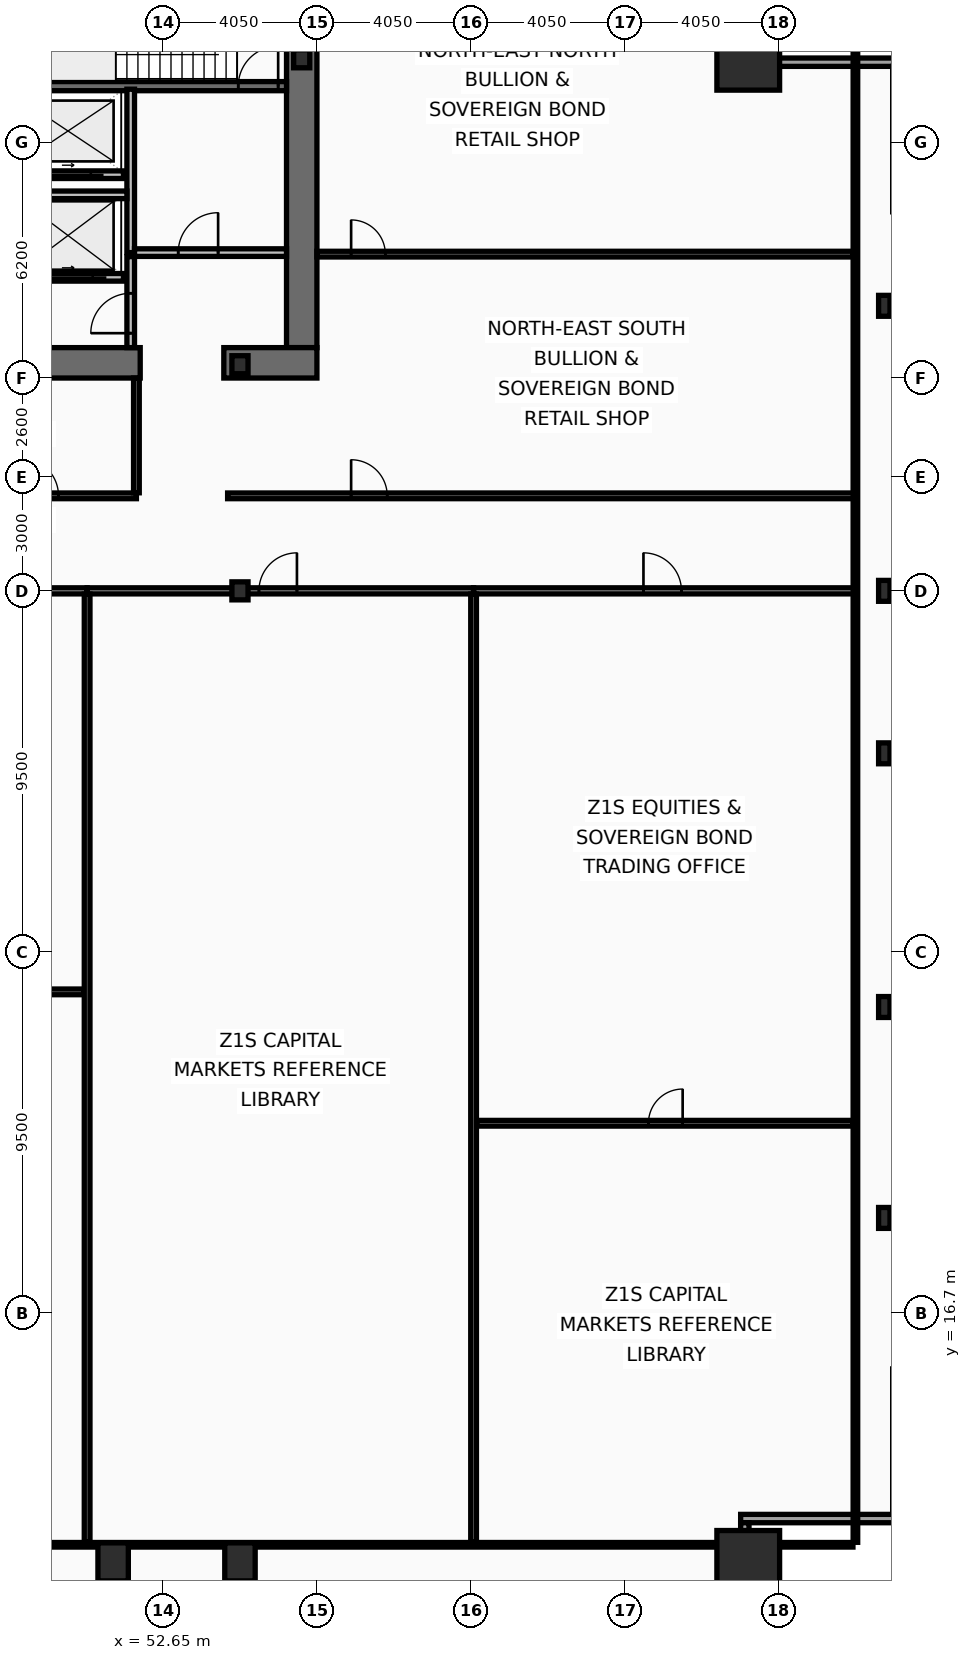
"""IFC4 building model, lengths in metres.
Left out: names, types, materials, properties, quantities, classifications, styles, units other than length and angle.
Written with IfcOpenShell. Run it as: python <this file> out.ifc"""

import sys

from ifc_helpers import new_model, si_unit, direction, frame, frame_2d, origin, origin_2d, place, context, subcontext, project, spatial, rectangle, hollow_rectangle, i_section, extrude, element, fill, save


model = new_model("IFC4")
c1 = context("Model", 3, precision=1e-05, world=origin(), true_north=direction((0.0, 1.0)))
c2 = subcontext(c1, "Body", "Model", "MODEL_VIEW")
j1 = project(units=[si_unit("LENGTHUNIT", "METRE"), si_unit("PLANEANGLEUNIT", "RADIAN")], contexts=[c1])
p1 = place(None, origin())
s1 = spatial("IfcSite", under=j1, at=p1, CompositionType="ELEMENT")
p2 = place(p1, origin())
s2 = spatial("IfcBuilding", under=s1, at=p2, CompositionType="ELEMENT")
p3 = place(p2, frame((0.0, 0.0, 65.8)))
s3 = spatial("IfcBuildingStorey", under=s2, at=p3, CompositionType="ELEMENT", Elevation=65.8)
p4 = place(p3, frame((56.3, 52.9, 0.0), z_axis=(0.0, 0.0, 1.0), x_axis=(0.0, -1.0, 0.0)))
e1 = element("IfcWall", 1, at=p4, inside=s3, PredefinedType="SHEAR", context=c2, shape_type="SweptSolid", body=[
    extrude(rectangle(XDim=10.8, YDim=0.8, at=frame_2d((5.4, 0.0))), origin(), (0.0, 0.0, 1.0), 3.82),
])
p5 = place(p3, frame((52.05, 41.7, 0.0), z_axis=(0.0, 0.0, 1.0), x_axis=(-1.0, 0.0, 0.0)))
e2 = element("IfcWall", 2, at=p5, inside=s3, PredefinedType="SHEAR", context=c2, shape_type="SweptSolid", body=[
    extrude(rectangle(XDim=11.3, YDim=0.8, at=frame_2d((5.65, 0.0))), origin(), (0.0, 0.0, 1.0), 3.82),
])
p6 = place(p3, frame((56.7, 41.7, 0.0), z_axis=(0.0, 0.0, 1.0), x_axis=(-1.0, 0.0, 0.0)))
e3 = element("IfcWall", 3, at=p6, inside=s3, PredefinedType="SHEAR", context=c2, shape_type="SweptSolid", body=[
    extrude(rectangle(XDim=2.45, YDim=0.8, at=frame_2d((1.225, 0.0))), origin(), (0.0, 0.0, 1.0), 3.82),
])
p7 = place(p3, frame((48.63, 48.98, 0.0), z_axis=(0.0, 0.0, 1.0), x_axis=(1.0, 0.0, 0.0)))
e4 = element("IfcWall", 4, at=p7, inside=s3, PredefinedType="SHEAR", context=c2, shape_type="SweptSolid", body=[
    extrude(rectangle(XDim=7.27, YDim=0.24, at=frame_2d((3.635, 0.0))), origin(), (0.0, 0.0, 1.0), 3.82),
])
p8 = place(p7, frame((6.0, 0.0, 0.0)))
e5 = element("IfcOpeningElement", 5, at=p8, cuts=e4, PredefinedType="OPENING", context=c2, shape_type="SweptSolid", body=[
    extrude(rectangle(XDim=1.05, YDim=2.15, at=frame_2d((0.525, 1.075))), frame((0.0, 0.13, 0.0), z_axis=(0.0, -1.0, 0.0), x_axis=(1.0, 0.0, 0.0)), (0.0, 0.0, 1.0), 0.26),
])
for number, where, z_axis, x_axis in (
    (6, (68.05, 10.15, 0.0), (0.0, 0.0, 1.0), (1.0, 0.0, 0.0)),
    (7, (68.05, 49.7, 0.0), (0.0, 0.0, 1.0), (1.0, 0.0, 0.0)),
):
    element("IfcColumn", number, at=place(p3, frame(where, z_axis=z_axis, x_axis=x_axis)), inside=s3, PredefinedType="COLUMN", context=c2, shape_type="SweptSolid", body=[
        extrude(hollow_rectangle(XDim=1.65, YDim=1.65, WallThickness=0.075, at=origin_2d()), origin(), (0.0, 0.0, 1.0), 4.0),
    ])
for number, where, z_axis, x_axis in (
    (8, (51.337, 10.15, 0.0), (0.0, 0.0, 1.0), (1.0, 0.0, 0.0)),
    (9, (54.675, 10.15, 0.0), (0.0, 0.0, 1.0), (1.0, 0.0, 0.0)),
):
    element("IfcColumn", number, at=place(p3, frame(where, z_axis=z_axis, x_axis=x_axis)), inside=s3, PredefinedType="COLUMN", context=c2, shape_type="SweptSolid", body=[
        extrude(hollow_rectangle(XDim=0.8, YDim=1.0, WallThickness=0.055, at=origin_2d()), origin(), (0.0, 0.0, 1.0), 4.0),
    ])
for number, where, z_axis, x_axis in (
    (10, (71.63, 19.2, 0.0), (0.0, 0.0, 1.0), (1.0, 0.0, 0.0)),
    (11, (71.63, 24.75, 0.0), (0.0, 0.0, 1.0), (1.0, 0.0, 0.0)),
    (12, (71.63, 31.425, 0.0), (0.0, 0.0, 1.0), (1.0, 0.0, 0.0)),
    (13, (71.63, 35.7, 0.0), (0.0, 0.0, 1.0), (1.0, 0.0, 0.0)),
    (14, (71.63, 43.2, 0.0), (0.0, 0.0, 1.0), (1.0, 0.0, 0.0)),
):
    element("IfcColumn", number, at=place(p3, frame(where, z_axis=z_axis, x_axis=x_axis)), inside=s3, PredefinedType="COLUMN", context=c2, shape_type="SweptSolid", body=[
        extrude(i_section(OverallWidth=0.3, OverallDepth=0.55, WebThickness=0.015, FlangeThickness=0.029, at=origin_2d()), origin(), (0.0, 0.0, 1.0), 4.0),
    ])
for number, where, z_axis, x_axis in (
    (15, (56.3, 49.7, 0.0), (0.0, 0.0, 1.0), (1.0, 0.0, 0.0)),
    (16, (54.675, 35.7, 0.0), (0.0, 0.0, 1.0), (1.0, 0.0, 0.0)),
    (17, (54.675, 41.65, 0.0), (0.0, 0.0, 1.0), (1.0, 0.0, 0.0)),
):
    element("IfcColumn", number, at=place(p3, frame(where, z_axis=z_axis, x_axis=x_axis)), inside=s3, PredefinedType="COLUMN", context=c2, shape_type="SweptSolid", body=[
        extrude(i_section(OverallWidth=0.424, OverallDepth=0.474, WebThickness=0.048, FlangeThickness=0.077, at=origin_2d()), origin(), (0.0, 0.0, 1.0), 4.0),
    ])
p9 = place(p3, frame((67.96, 53.63, 0.0), z_axis=(0.0, 0.0, 1.0), x_axis=(0.0, -1.0, 0.0)))
e18 = element("IfcWall", 18, at=p9, inside=s3, PredefinedType="SOLIDWALL", context=c2, shape_type="SweptSolid", body=[
    extrude(rectangle(XDim=3.91, YDim=0.22, at=frame_2d((1.955, 0.0))), origin(), (0.0, 0.0, 1.0), 3.16),
])
for number, where, z_axis, x_axis in (
    (19, (67.85, 49.61, 0.0), (0.0, 0.0, 1.0), (1.0, 0.0, 0.0)),
    (20, (72.07, 11.29, 0.0), (0.0, 0.0, 1.0), (-1.0, 0.0, 0.0)),
):
    element("IfcWall", number, at=place(p3, frame(where, z_axis=z_axis, x_axis=x_axis)), inside=s3, PredefinedType="SOLIDWALL", context=c2, shape_type="SweptSolid", body=[
        extrude(rectangle(XDim=4.22, YDim=0.22, at=frame_2d((2.11, 0.0))), origin(), (0.0, 0.0, 1.0), 3.16),
    ])
p10 = place(p3, frame((67.96, 11.18, 0.0), z_axis=(0.0, 0.0, 1.0), x_axis=(0.0, -1.0, 0.0)))
e21 = element("IfcWall", 21, at=p10, inside=s3, PredefinedType="SOLIDWALL", context=c2, shape_type="SweptSolid", body=[
    extrude(rectangle(XDim=3.91, YDim=0.22, at=frame_2d((1.955, 0.0))), origin(), (0.0, 0.0, 1.0), 3.16),
])
p11 = place(p3, frame((51.61, 43.95, 0.0), z_axis=(0.0, 0.0, 1.0), x_axis=(-1.0, 0.0, 0.0)))
e22 = element("IfcWall", 22, at=p11, inside=s3, PredefinedType="PARTITIONING", context=c2, shape_type="SweptSolid", body=[
    extrude(rectangle(XDim=2.92, YDim=0.2, at=frame_2d((1.46, 0.0))), origin(), (0.0, 0.0, 1.0), 3.82),
])
p12 = place(p11, frame((0.81, 0.0, 0.0)))
e23 = element("IfcOpeningElement", 23, at=p12, cuts=e22, PredefinedType="OPENING", context=c2, shape_type="SweptSolid", body=[
    extrude(rectangle(XDim=1.3, YDim=2.18, at=frame_2d((0.65, 1.09))), frame((0.0, 0.11, 0.0), z_axis=(0.0, -1.0, 0.0), x_axis=(1.0, 0.0, 0.0)), (0.0, 0.0, 1.0), 0.22),
])
p13 = place(p3, frame((51.61, 46.65, 0.0), z_axis=(0.0, 0.0, 1.0), x_axis=(-1.0, 0.0, 0.0)))
e24 = element("IfcWall", 24, at=p13, inside=s3, PredefinedType="PARTITIONING", context=c2, shape_type="SweptSolid", body=[
    extrude(rectangle(XDim=2.92, YDim=0.2, at=frame_2d((1.46, 0.0))), origin(), (0.0, 0.0, 1.0), 3.82),
])
p14 = place(p13, frame((0.86, 0.0, 0.0)))
e25 = element("IfcOpeningElement", 25, at=p14, cuts=e24, PredefinedType="OPENING", context=c2, shape_type="SweptSolid", body=[
    extrude(rectangle(XDim=1.2, YDim=2.18, at=frame_2d((0.6, 1.09))), frame((0.0, 0.11, 0.0), z_axis=(0.0, -1.0, 0.0), x_axis=(1.0, 0.0, 0.0)), (0.0, 0.0, 1.0), 0.22),
])
p15 = place(p3, frame((51.8, 44.6, 0.0), z_axis=(0.0, 0.0, 1.0), x_axis=(0.0, 1.0, 0.0)))
e26 = element("IfcWall", 26, at=p15, inside=s3, PredefinedType="PARTITIONING", context=c2, shape_type="SweptSolid", body=[
    extrude(rectangle(XDim=4.3, YDim=0.2, at=frame_2d((2.15, 0.0))), origin(), (0.0, 0.0, 1.0), 3.82),
])
p16 = place(p3, frame((51.9, 44.6, 0.0), z_axis=(0.0, 0.0, 1.0), x_axis=(1.0, 0.0, 0.0)))
e27 = element("IfcWall", 27, at=p16, inside=s3, PredefinedType="PARTITIONING", context=c2, shape_type="SweptSolid", body=[
    extrude(rectangle(XDim=4.0, YDim=0.2, at=frame_2d((2.0, 0.0))), origin(), (0.0, 0.0, 1.0), 3.82),
])
p17 = place(p16, frame((1.15, 0.0, 0.0)))
e28 = element("IfcOpeningElement", 28, at=p17, cuts=e27, PredefinedType="OPENING", context=c2, shape_type="SweptSolid", body=[
    extrude(rectangle(XDim=1.05, YDim=2.15, at=frame_2d((0.525, 1.075))), frame((0.0, 0.11, 0.0), z_axis=(0.0, -1.0, 0.0), x_axis=(1.0, 0.0, 0.0)), (0.0, 0.0, 1.0), 0.22),
])
p18 = place(p3, frame((48.63, 46.12, 0.0), z_axis=(0.0, 0.0, 1.0), x_axis=(1.0, 0.0, 0.0)))
e29 = element("IfcWall", 29, at=p18, inside=s3, PredefinedType="PARTITIONING", context=c2, shape_type="SweptSolid", body=[
    extrude(rectangle(XDim=3.07, YDim=0.2, at=frame_2d((1.535, 0.0))), origin(), (0.0, 0.0, 1.0), 3.82),
])
p19 = place(p3, frame((51.8, 42.1, 0.0), z_axis=(0.0, 0.0, 1.0), x_axis=(0.0, 1.0, 0.0)))
e30 = element("IfcWall", 30, at=p19, inside=s3, PredefinedType="PARTITIONING", context=c2, shape_type="SweptSolid", body=[
    extrude(rectangle(XDim=2.395, YDim=0.2, at=frame_2d((1.198, 0.0))), origin(), (0.0, 0.0, 1.0), 3.82),
])
p20 = place(p19, frame((0.38, 0.0, 0.0)))
e31 = element("IfcOpeningElement", 31, at=p20, cuts=e30, PredefinedType="OPENING", context=c2, shape_type="SweptSolid", body=[
    extrude(rectangle(XDim=1.05, YDim=2.15, at=frame_2d((0.525, 1.075))), frame((0.0, 0.11, 0.0), z_axis=(0.0, -1.0, 0.0), x_axis=(1.0, 0.0, 0.0)), (0.0, 0.0, 1.0), 0.22),
])
p21 = place(p3, frame((47.8, 38.2, 0.0), z_axis=(0.0, 0.0, 1.0), x_axis=(1.0, 0.0, 0.0)))
e32 = element("IfcWall", 32, at=p21, inside=s3, PredefinedType="PARTITIONING", context=c2, shape_type="SweptSolid", body=[
    extrude(rectangle(XDim=4.15, YDim=0.15, at=frame_2d((2.075, 0.0))), origin(), (0.0, 0.0, 1.0), 3.01),
])
p22 = place(p21, frame((1.1, 0.0, 0.0)))
e33 = element("IfcOpeningElement", 33, at=p22, cuts=e32, PredefinedType="OPENING", context=c2, shape_type="SweptSolid", body=[
    extrude(rectangle(XDim=1.0, YDim=2.05, at=frame_2d((0.5, 1.025))), frame((0.0, 0.085, 0.0), z_axis=(0.0, -1.0, 0.0), x_axis=(1.0, 0.0, 0.0)), (0.0, 0.0, 1.0), 0.17),
])
p23 = place(p3, frame((51.95, 38.28, 0.0), z_axis=(0.0, 0.0, 1.0), x_axis=(0.0, 1.0, 0.0)))
e34 = element("IfcWall", 34, at=p23, inside=s3, PredefinedType="PARTITIONING", context=c2, shape_type="SweptSolid", body=[
    extrude(rectangle(XDim=3.02, YDim=0.15, at=frame_2d((1.51, 0.0))), origin(), (0.0, 0.0, 1.0), 3.82),
])
p24 = place(p3, frame((54.35, 38.2, 0.0), z_axis=(0.0, 0.0, 1.0), x_axis=(1.0, 0.0, 0.0)))
e35 = element("IfcWall", 35, at=p24, inside=s3, PredefinedType="PARTITIONING", context=c2, shape_type="SweptSolid", body=[
    extrude(rectangle(XDim=16.52, YDim=0.15, at=frame_2d((8.26, 0.0))), origin(), (0.0, 0.0, 1.0), 3.01),
])
p25 = place(p24, frame((3.25, 0.0, 0.0)))
e36 = element("IfcOpeningElement", 36, at=p25, cuts=e35, PredefinedType="OPENING", context=c2, shape_type="SweptSolid", body=[
    extrude(rectangle(XDim=0.95, YDim=2.05, at=frame_2d((0.475, 1.025))), frame((0.0, 0.085, 0.0), z_axis=(0.0, -1.0, 0.0), x_axis=(1.0, 0.0, 0.0)), (0.0, 0.0, 1.0), 0.17),
])
p26 = place(p3, frame((56.7, 44.56, 0.0), z_axis=(0.0, 0.0, 1.0), x_axis=(1.0, 0.0, 0.0)))
e37 = element("IfcWall", 37, at=p26, inside=s3, PredefinedType="PARTITIONING", context=c2, shape_type="SweptSolid", body=[
    extrude(rectangle(XDim=14.105, YDim=0.15, at=frame_2d((7.052, 0.0))), origin(), (0.0, 0.0, 1.0), 3.16),
])
p27 = place(p26, frame((0.9, 0.0, 0.0)))
e38 = element("IfcOpeningElement", 38, at=p27, cuts=e37, PredefinedType="OPENING", context=c2, shape_type="SweptSolid", body=[
    extrude(rectangle(XDim=0.9, YDim=2.05, at=frame_2d((0.45, 1.025))), frame((0.0, 0.085, 0.0), z_axis=(0.0, -1.0, 0.0), x_axis=(1.0, 0.0, 0.0)), (0.0, 0.0, 1.0), 0.17),
])
p28 = place(p3, frame((42.49, 35.7, 0.0), z_axis=(0.0, 0.0, 1.0), x_axis=(1.0, 0.0, 0.0)))
e39 = element("IfcWall", 39, at=p28, inside=s3, PredefinedType="PARTITIONING", context=c2, shape_type="SweptSolid", body=[
    extrude(rectangle(XDim=8.163, YDim=0.16, at=frame_2d((4.082, 0.0))), origin(), (0.0, 0.0, 1.0), 3.01),
])
p29 = place(p28, frame((3.678, 0.0, 0.0)))
e40 = element("IfcOpeningElement", 40, at=p29, cuts=e39, PredefinedType="OPENING", context=c2, shape_type="SweptSolid", body=[
    extrude(rectangle(XDim=1.0, YDim=2.05, at=frame_2d((0.5, 1.025))), frame((0.0, 0.09, 0.0), z_axis=(0.0, -1.0, 0.0), x_axis=(1.0, 0.0, 0.0)), (0.0, 0.0, 1.0), 0.18),
])
p30 = place(p3, frame((42.571, 25.148, 0.0), z_axis=(0.0, 0.0, 1.0), x_axis=(1.0, 0.0, 0.0)))
e41 = element("IfcWall", 41, at=p30, inside=s3, PredefinedType="PARTITIONING", context=c2, shape_type="SweptSolid", body=[
    extrude(rectangle(XDim=8.003, YDim=0.15, at=frame_2d((4.001, 0.0))), origin(), (0.0, 0.0, 1.0), 3.01),
])
p31 = place(p30, frame((3.673, 0.0, 0.0)))
e42 = element("IfcOpeningElement", 42, at=p31, cuts=e41, PredefinedType="OPENING", context=c2, shape_type="SweptSolid", body=[
    extrude(rectangle(XDim=0.9, YDim=2.05, at=frame_2d((0.45, 1.025))), frame((0.0, 0.085, 0.0), z_axis=(0.0, -1.0, 0.0), x_axis=(1.0, 0.0, 0.0)), (0.0, 0.0, 1.0), 0.17),
])
p32 = place(p3, frame((50.653, 35.7, 0.0), z_axis=(0.0, 0.0, 1.0), x_axis=(1.0, 0.0, 0.0)))
e43 = element("IfcWall", 43, at=p32, inside=s3, PredefinedType="PARTITIONING", context=c2, shape_type="SweptSolid", body=[
    extrude(rectangle(XDim=10.169, YDim=0.16, at=frame_2d((5.084, 0.0))), origin(), (0.0, 0.0, 1.0), 3.01),
])
p33 = place(p32, frame((4.521, 0.0, 0.0)))
e44 = element("IfcOpeningElement", 44, at=p33, cuts=e43, PredefinedType="OPENING", context=c2, shape_type="SweptSolid", body=[
    extrude(rectangle(XDim=1.0, YDim=2.05, at=frame_2d((0.5, 1.025))), frame((0.0, 0.09, 0.0), z_axis=(0.0, -1.0, 0.0), x_axis=(1.0, 0.0, 0.0)), (0.0, 0.0, 1.0), 0.18),
])
p34 = place(p3, frame((50.653, 10.665, 0.0), z_axis=(0.0, 0.0, 1.0), x_axis=(0.0, 1.0, 0.0)))
e45 = element("IfcWall", 45, at=p34, inside=s3, PredefinedType="PARTITIONING", context=c2, shape_type="SweptSolid", body=[
    extrude(rectangle(XDim=24.95, YDim=0.15, at=frame_2d((12.475, 0.0))), origin(), (0.0, 0.0, 1.0), 3.21),
])
p35 = place(p3, frame((60.823, 35.7, 0.0), z_axis=(0.0, 0.0, 1.0), x_axis=(1.0, 0.0, 0.0)))
e46 = element("IfcWall", 46, at=p35, inside=s3, PredefinedType="PARTITIONING", context=c2, shape_type="SweptSolid", body=[
    extrude(rectangle(XDim=10.048, YDim=0.16, at=frame_2d((5.024, 0.0))), origin(), (0.0, 0.0, 1.0), 3.01),
])
p36 = place(p35, frame((4.47, 0.0, 0.0)))
e47 = element("IfcOpeningElement", 47, at=p36, cuts=e46, PredefinedType="OPENING", context=c2, shape_type="SweptSolid", body=[
    extrude(rectangle(XDim=1.0, YDim=2.05, at=frame_2d((0.5, 1.025))), frame((0.0, 0.09, 0.0), z_axis=(0.0, -1.0, 0.0), x_axis=(1.0, 0.0, 0.0)), (0.0, 0.0, 1.0), 0.18),
])
p37 = place(p3, frame((60.823, 10.665, 0.0), z_axis=(0.0, 0.0, 1.0), x_axis=(0.0, 1.0, 0.0)))
e48 = element("IfcWall", 48, at=p37, inside=s3, PredefinedType="PARTITIONING", context=c2, shape_type="SweptSolid", body=[
    extrude(rectangle(XDim=24.95, YDim=0.15, at=frame_2d((12.475, 0.0))), origin(), (0.0, 0.0, 1.0), 3.01),
])
p38 = place(p3, frame((60.903, 21.692, 0.0), z_axis=(0.0, 0.0, 1.0), x_axis=(1.0, 0.0, 0.0)))
e49 = element("IfcWall", 49, at=p38, inside=s3, PredefinedType="PARTITIONING", context=c2, shape_type="SweptSolid", body=[
    extrude(rectangle(XDim=9.902, YDim=0.15, at=frame_2d((4.951, 0.0))), origin(), (0.0, 0.0, 1.0), 3.82),
])
p39 = place(p38, frame((4.521, 0.0, 0.0)))
e50 = element("IfcOpeningElement", 50, at=p39, cuts=e49, PredefinedType="OPENING", context=c2, shape_type="SweptSolid", body=[
    extrude(rectangle(XDim=0.9, YDim=2.05, at=frame_2d((0.45, 1.025))), frame((0.0, 0.085, 0.0), z_axis=(0.0, -1.0, 0.0), x_axis=(1.0, 0.0, 0.0)), (0.0, 0.0, 1.0), 0.17),
])
p40 = place(p3, frame((70.87, 10.665, 0.0), z_axis=(0.0, 0.0, 1.0), x_axis=(0.0, 1.0, 0.0)))
e51 = element("IfcWall", 51, at=p40, inside=s3, PredefinedType="PARTITIONING", context=c2, shape_type="SweptSolid", body=[
    extrude(rectangle(XDim=42.11, YDim=0.12, at=frame_2d((21.055, 0.0))), origin(), (0.0, 0.0, 1.0), 3.01),
])
p41 = place(p3, frame((2.095, 10.6, 0.0), z_axis=(0.0, 0.0, 1.0), x_axis=(1.0, 0.0, 0.0)))
e52 = element("IfcWall", 52, at=p41, inside=s3, PredefinedType="PARTITIONING", context=c2, shape_type="SweptSolid", body=[
    extrude(rectangle(XDim=68.71, YDim=0.12, at=frame_2d((34.355, 0.0))), origin(), (0.0, 0.0, 1.0), 3.01),
])
p42 = place(p8, origin())
e53 = element("IfcDoor", 53, at=p42, inside=s3, OperationType="SINGLE_SWING_RIGHT", PredefinedType="DOOR", context=c2, shape_type="SweptSolid", body=[
    extrude(rectangle(XDim=1.05, YDim=2.15, at=frame_2d((0.525, 1.075))), frame((0.0, 0.025, 0.0), z_axis=(0.0, -1.0, 0.0), x_axis=(1.0, 0.0, 0.0)), (0.0, 0.0, 1.0), 0.05),
])
fill(e5, e53)
p43 = place(p12, origin())
e54 = element("IfcDoor", 54, at=p43, inside=s3, OperationType="SLIDING_TO_LEFT", PredefinedType="DOOR", context=c2, shape_type="SweptSolid", body=[
    extrude(rectangle(XDim=1.3, YDim=2.18, at=frame_2d((0.65, 1.09))), frame((0.0, 0.025, 0.0), z_axis=(0.0, -1.0, 0.0), x_axis=(1.0, 0.0, 0.0)), (0.0, 0.0, 1.0), 0.05),
])
fill(e23, e54)
p44 = place(p14, origin())
e55 = element("IfcDoor", 55, at=p44, inside=s3, OperationType="SLIDING_TO_LEFT", PredefinedType="DOOR", context=c2, shape_type="SweptSolid", body=[
    extrude(rectangle(XDim=1.2, YDim=2.18, at=frame_2d((0.6, 1.09))), frame((0.0, 0.025, 0.0), z_axis=(0.0, -1.0, 0.0), x_axis=(1.0, 0.0, 0.0)), (0.0, 0.0, 1.0), 0.05),
])
fill(e25, e55)
p45 = place(p17, origin())
e56 = element("IfcDoor", 56, at=p45, inside=s3, OperationType="SINGLE_SWING_RIGHT", PredefinedType="DOOR", context=c2, shape_type="SweptSolid", body=[
    extrude(rectangle(XDim=1.05, YDim=2.15, at=frame_2d((0.525, 1.075))), frame((0.0, 0.025, 0.0), z_axis=(0.0, -1.0, 0.0), x_axis=(1.0, 0.0, 0.0)), (0.0, 0.0, 1.0), 0.05),
])
fill(e28, e56)
p46 = place(p20, origin())
e57 = element("IfcDoor", 57, at=p46, inside=s3, OperationType="SINGLE_SWING_LEFT", PredefinedType="DOOR", context=c2, shape_type="SweptSolid", body=[
    extrude(rectangle(XDim=1.05, YDim=2.15, at=frame_2d((0.525, 1.075))), frame((0.0, 0.025, 0.0), z_axis=(0.0, -1.0, 0.0), x_axis=(1.0, 0.0, 0.0)), (0.0, 0.0, 1.0), 0.05),
])
fill(e31, e57)
p47 = place(p22, origin())
e58 = element("IfcDoor", 58, at=p47, inside=s3, OperationType="SINGLE_SWING_LEFT", PredefinedType="DOOR", context=c2, shape_type="SweptSolid", body=[
    extrude(rectangle(XDim=1.0, YDim=2.05, at=frame_2d((0.5, 1.025))), frame((0.0, 0.025, 0.0), z_axis=(0.0, -1.0, 0.0), x_axis=(1.0, 0.0, 0.0)), (0.0, 0.0, 1.0), 0.05),
])
fill(e33, e58)
p48 = place(p25, origin())
e59 = element("IfcDoor", 59, at=p48, inside=s3, OperationType="SINGLE_SWING_LEFT", PredefinedType="DOOR", context=c2, shape_type="SweptSolid", body=[
    extrude(rectangle(XDim=0.95, YDim=2.05, at=frame_2d((0.475, 1.025))), frame((0.0, 0.025, 0.0), z_axis=(0.0, -1.0, 0.0), x_axis=(1.0, 0.0, 0.0)), (0.0, 0.0, 1.0), 0.05),
])
fill(e36, e59)
p49 = place(p27, origin())
e60 = element("IfcDoor", 60, at=p49, inside=s3, OperationType="SINGLE_SWING_LEFT", PredefinedType="DOOR", context=c2, shape_type="SweptSolid", body=[
    extrude(rectangle(XDim=0.9, YDim=2.05, at=frame_2d((0.45, 1.025))), frame((0.0, 0.025, 0.0), z_axis=(0.0, -1.0, 0.0), x_axis=(1.0, 0.0, 0.0)), (0.0, 0.0, 1.0), 0.05),
])
fill(e38, e60)
p50 = place(p33, origin())
e61 = element("IfcDoor", 61, at=p50, inside=s3, OperationType="SINGLE_SWING_RIGHT", PredefinedType="DOOR", context=c2, shape_type="SweptSolid", body=[
    extrude(rectangle(XDim=1.0, YDim=2.05, at=frame_2d((0.5, 1.025))), frame((0.0, 0.025, 0.0), z_axis=(0.0, -1.0, 0.0), x_axis=(1.0, 0.0, 0.0)), (0.0, 0.0, 1.0), 0.05),
])
fill(e44, e61)
p51 = place(p36, origin())
e62 = element("IfcDoor", 62, at=p51, inside=s3, OperationType="SINGLE_SWING_LEFT", PredefinedType="DOOR", context=c2, shape_type="SweptSolid", body=[
    extrude(rectangle(XDim=1.0, YDim=2.05, at=frame_2d((0.5, 1.025))), frame((0.0, 0.025, 0.0), z_axis=(0.0, -1.0, 0.0), x_axis=(1.0, 0.0, 0.0)), (0.0, 0.0, 1.0), 0.05),
])
fill(e47, e62)
p52 = place(p39, origin())
e63 = element("IfcDoor", 63, at=p52, inside=s3, OperationType="SINGLE_SWING_RIGHT", PredefinedType="DOOR", context=c2, shape_type="SweptSolid", body=[
    extrude(rectangle(XDim=0.9, YDim=2.05, at=frame_2d((0.45, 1.025))), frame((0.0, 0.025, 0.0), z_axis=(0.0, -1.0, 0.0), x_axis=(1.0, 0.0, 0.0)), (0.0, 0.0, 1.0), 0.05),
])
fill(e50, e63)
save(model, sys.argv[1])
